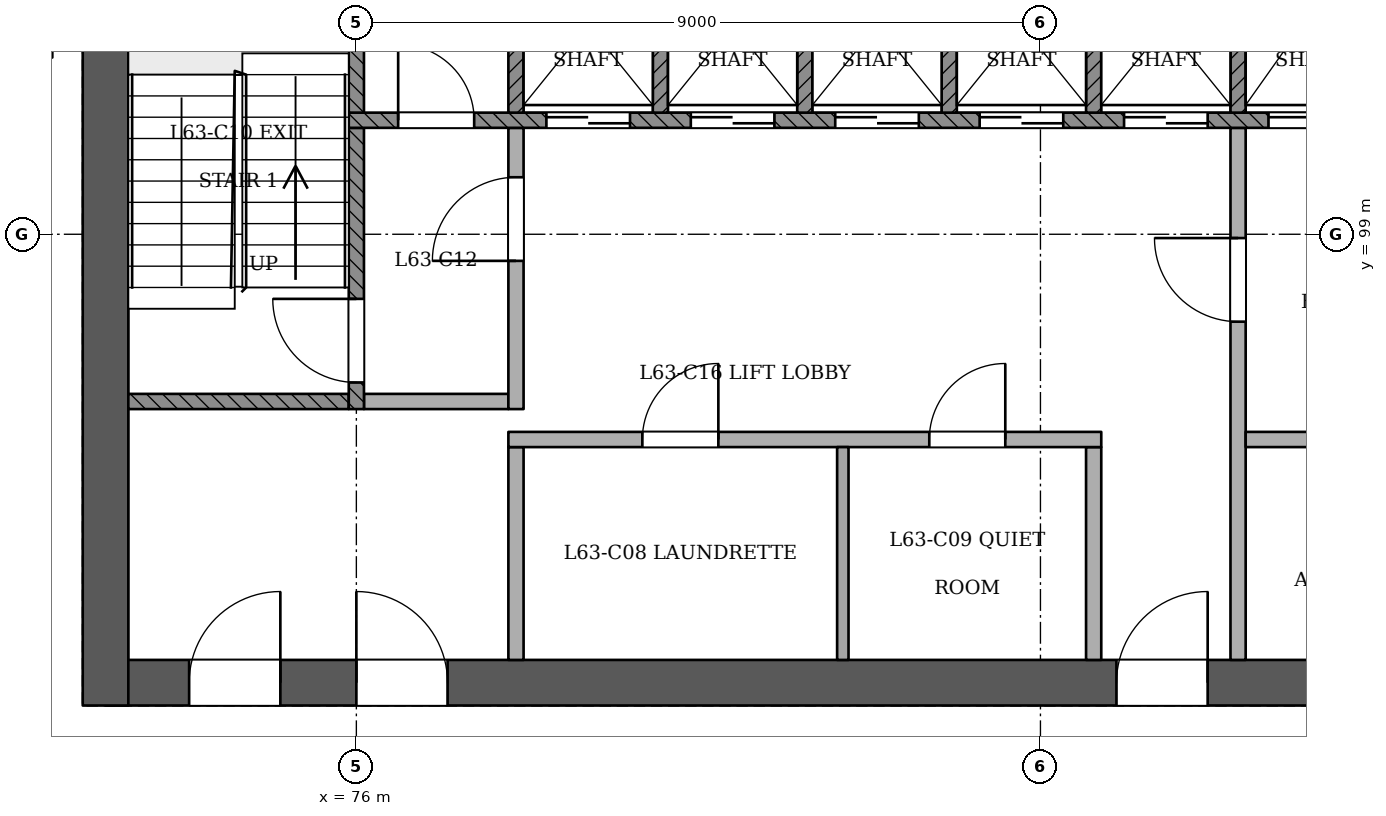
"""IFC4 building model, lengths in metres.
Left out: names, types, materials, properties, quantities, classifications, styles, units other than length and angle.
Written with IfcOpenShell. Run it as: python <this file> out.ifc"""

import sys

from ifc_helpers import new_model, si_unit, direction, frame, frame_2d, origin, place, context, subcontext, project, spatial, rectangle, extrude, element, fill, save


model = new_model("IFC4")
c1 = context("Model", 3, precision=1e-05, world=origin(), true_north=direction((0.0, 1.0)))
c2 = subcontext(c1, "Body", "Model", "MODEL_VIEW")
j1 = project(units=[si_unit("LENGTHUNIT", "METRE"), si_unit("PLANEANGLEUNIT", "RADIAN")], contexts=[c1])
p1 = place(None, origin())
s1 = spatial("IfcSite", under=j1, at=p1, CompositionType="ELEMENT")
p2 = place(p1, origin())
s2 = spatial("IfcBuilding", under=s1, at=p2, CompositionType="ELEMENT")
p3 = place(p2, frame((0.0, 0.0, 246.4)))
s3 = spatial("IfcBuildingStorey", under=s2, at=p3, CompositionType="ELEMENT", Elevation=246.4)
p4 = place(p3, frame((72.7, 93.1, 0.0), z_axis=(0.0, 0.0, 1.0), x_axis=(1.0, 0.0, 0.0)))
e1 = element("IfcWall", 1, at=p4, inside=s3, PredefinedType="SHEAR", context=c2, shape_type="SweptSolid", body=[
    extrude(rectangle(XDim=24.9, YDim=0.6, at=frame_2d((12.45, 0.0))), origin(), (0.0, 0.0, 1.0), 3.6),
])
p5 = place(p4, frame((1.1, 0.0, 0.0)))
e2 = element("IfcOpeningElement", 2, at=p5, cuts=e1, PredefinedType="OPENING", context=c2, shape_type="SweptSolid", body=[
    extrude(rectangle(XDim=1.2, YDim=2.1, at=frame_2d((0.6, 1.05))), frame((0.0, 0.311, 0.0), z_axis=(0.0, -1.0, 0.0), x_axis=(1.0, 0.0, 0.0)), (0.0, 0.0, 1.0), 0.621),
])
p6 = place(p4, frame((3.3, 0.0, 0.0)))
e3 = element("IfcOpeningElement", 3, at=p6, cuts=e1, PredefinedType="OPENING", context=c2, shape_type="SweptSolid", body=[
    extrude(rectangle(XDim=1.2, YDim=2.1, at=frame_2d((0.6, 1.05))), frame((0.0, 0.311, 0.0), z_axis=(0.0, -1.0, 0.0), x_axis=(1.0, 0.0, 0.0)), (0.0, 0.0, 1.0), 0.621),
])
p7 = place(p4, frame((13.3, 0.0, 0.0)))
e4 = element("IfcOpeningElement", 4, at=p7, cuts=e1, PredefinedType="OPENING", context=c2, shape_type="SweptSolid", body=[
    extrude(rectangle(XDim=1.2, YDim=2.1, at=frame_2d((0.6, 1.05))), frame((0.0, 0.311, 0.0), z_axis=(0.0, -1.0, 0.0), x_axis=(1.0, 0.0, 0.0)), (0.0, 0.0, 1.0), 0.621),
])
p8 = place(p4, frame((16.012, 0.0, 0.0)))
e5 = element("IfcOpeningElement", 5, at=p8, cuts=e1, PredefinedType="OPENING", context=c2, shape_type="SweptSolid", body=[
    extrude(rectangle(XDim=1.0, YDim=2.1, at=frame_2d((0.5, 1.05))), frame((0.0, 0.311, 0.0), z_axis=(0.0, -1.0, 0.0), x_axis=(1.0, 0.0, 0.0)), (0.0, 0.0, 1.0), 0.621),
])
p9 = place(p4, frame((19.9, 0.0, 0.0)))
e6 = element("IfcOpeningElement", 6, at=p9, cuts=e1, PredefinedType="OPENING", context=c2, shape_type="SweptSolid", body=[
    extrude(rectangle(XDim=1.0, YDim=2.1, at=frame_2d((0.5, 1.05))), frame((0.0, 0.311, 0.0), z_axis=(0.0, -1.0, 0.0), x_axis=(1.0, 0.0, 0.0)), (0.0, 0.0, 1.0), 0.621),
])
p10 = place(p4, frame((23.038, 0.0, 0.0)))
e7 = element("IfcOpeningElement", 7, at=p10, cuts=e1, PredefinedType="OPENING", context=c2, shape_type="SweptSolid", body=[
    extrude(rectangle(XDim=1.0, YDim=2.1, at=frame_2d((0.5, 1.05))), frame((0.0, 0.311, 0.0), z_axis=(0.0, -1.0, 0.0), x_axis=(1.0, 0.0, 0.0)), (0.0, 0.0, 1.0), 0.621),
])
p11 = place(p3, frame((72.7, 103.7, 0.0), z_axis=(0.0, 0.0, 1.0), x_axis=(0.0, -1.0, 0.0)))
e8 = element("IfcWall", 8, at=p11, inside=s3, PredefinedType="SHEAR", context=c2, shape_type="SweptSolid", body=[
    extrude(rectangle(XDim=10.9, YDim=0.6, at=frame_2d((5.45, 0.0))), origin(), (0.0, 0.0, 1.0), 3.6),
])
p12 = place(p3, frame((72.0, 101.4, 0.0), z_axis=(0.0, 0.0, 1.0), x_axis=(-1.0, 0.0, 0.0)))
e9 = element("IfcWall", 9, at=p12, inside=s3, PredefinedType="PARTITIONING", context=c2, shape_type="SweptSolid", body=[
    extrude(rectangle(XDim=1.8, YDim=0.15, at=frame_2d((0.9, 0.0))), origin(), (0.0, 0.0, 1.0), 3.2),
])
p13 = place(p12, frame((0.525, 0.0, 0.0)))
e10 = element("IfcOpeningElement", 10, at=p13, cuts=e9, PredefinedType="OPENING", context=c2, shape_type="SweptSolid", body=[
    extrude(rectangle(XDim=1.0, YDim=2.1, at=frame_2d((0.5, 1.05))), frame((0.0, 0.085, 0.0), z_axis=(0.0, -1.0, 0.0), x_axis=(1.0, 0.0, 0.0)), (0.0, 0.0, 1.0), 0.171),
])
p14 = place(p3, frame((78.1, 93.4, 0.0), z_axis=(0.0, 0.0, 1.0), x_axis=(0.0, 1.0, 0.0)))
e11 = element("IfcWall", 11, at=p14, inside=s3, PredefinedType="PARTITIONING", context=c2, shape_type="SweptSolid", body=[
    extrude(rectangle(XDim=2.8, YDim=0.2, at=frame_2d((1.4, 0.0))), origin(), (0.0, 0.0, 1.0), 3.2),
])
p15 = place(p3, frame((82.4, 93.4, 0.0), z_axis=(0.0, 0.0, 1.0), x_axis=(0.0, 1.0, 0.0)))
e12 = element("IfcWall", 12, at=p15, inside=s3, PredefinedType="PARTITIONING", context=c2, shape_type="SweptSolid", body=[
    extrude(rectangle(XDim=2.8, YDim=0.15, at=frame_2d((1.4, 0.0))), origin(), (0.0, 0.0, 1.0), 3.2),
])
p16 = place(p3, frame((85.7, 93.4, 0.0), z_axis=(0.0, 0.0, 1.0), x_axis=(0.0, 1.0, 0.0)))
e13 = element("IfcWall", 13, at=p16, inside=s3, PredefinedType="PARTITIONING", context=c2, shape_type="SweptSolid", body=[
    extrude(rectangle(XDim=2.8, YDim=0.2, at=frame_2d((1.4, 0.0))), origin(), (0.0, 0.0, 1.0), 3.2),
])
p17 = place(p3, frame((87.6, 93.4, 0.0), z_axis=(0.0, 0.0, 1.0), x_axis=(0.0, 1.0, 0.0)))
e14 = element("IfcWall", 14, at=p17, inside=s3, PredefinedType="PARTITIONING", context=c2, shape_type="SweptSolid", body=[
    extrude(rectangle(XDim=7.0, YDim=0.2, at=frame_2d((3.5, 0.0))), origin(), (0.0, 0.0, 1.0), 3.2),
])
p18 = place(p17, frame((4.45, 0.0, 0.0)))
e15 = element("IfcOpeningElement", 15, at=p18, cuts=e14, PredefinedType="OPENING", context=c2, shape_type="SweptSolid", body=[
    extrude(rectangle(XDim=1.1, YDim=2.1, at=frame_2d((0.55, 1.05))), frame((0.0, 0.11, 0.0), z_axis=(0.0, -1.0, 0.0), x_axis=(1.0, 0.0, 0.0)), (0.0, 0.0, 1.0), 0.221),
])
p19 = place(p3, frame((78.0, 96.3, 0.0), z_axis=(0.0, 0.0, 1.0), x_axis=(1.0, 0.0, 0.0)))
e16 = element("IfcWall", 16, at=p19, inside=s3, PredefinedType="PARTITIONING", context=c2, shape_type="SweptSolid", body=[
    extrude(rectangle(XDim=7.8, YDim=0.2, at=frame_2d((3.9, 0.0))), origin(), (0.0, 0.0, 1.0), 3.2),
])
p20 = place(p19, frame((1.762, 0.0, 0.0)))
e17 = element("IfcOpeningElement", 17, at=p20, cuts=e16, PredefinedType="OPENING", context=c2, shape_type="SweptSolid", body=[
    extrude(rectangle(XDim=1.0, YDim=2.1, at=frame_2d((0.5, 1.05))), frame((0.0, 0.11, 0.0), z_axis=(0.0, -1.0, 0.0), x_axis=(1.0, 0.0, 0.0)), (0.0, 0.0, 1.0), 0.221),
])
p21 = place(p19, frame((5.538, 0.0, 0.0)))
e18 = element("IfcOpeningElement", 18, at=p21, cuts=e16, PredefinedType="OPENING", context=c2, shape_type="SweptSolid", body=[
    extrude(rectangle(XDim=1.0, YDim=2.1, at=frame_2d((0.5, 1.05))), frame((0.0, 0.11, 0.0), z_axis=(0.0, -1.0, 0.0), x_axis=(1.0, 0.0, 0.0)), (0.0, 0.0, 1.0), 0.221),
])
p22 = place(p3, frame((87.7, 96.3, 0.0), z_axis=(0.0, 0.0, 1.0), x_axis=(1.0, 0.0, 0.0)))
e19 = element("IfcWall", 19, at=p22, inside=s3, PredefinedType="PARTITIONING", context=c2, shape_type="SweptSolid", body=[
    extrude(rectangle(XDim=3.6, YDim=0.2, at=frame_2d((1.8, 0.0))), origin(), (0.0, 0.0, 1.0), 3.2),
])
p23 = place(p3, frame((73.0, 96.8, 0.0), z_axis=(0.0, 0.0, 1.0), x_axis=(1.0, 0.0, 0.0)))
e20 = element("IfcWall", 20, at=p23, inside=s3, PredefinedType="SOLIDWALL", context=c2, shape_type="SweptSolid", body=[
    extrude(rectangle(XDim=2.9, YDim=0.2, at=frame_2d((1.45, 0.0))), origin(), (0.0, 0.0, 1.0), 3.2),
])
p24 = place(p3, frame((76.0, 96.7, 0.0), z_axis=(0.0, 0.0, 1.0), x_axis=(0.0, 1.0, 0.0)))
e21 = element("IfcWall", 21, at=p24, inside=s3, PredefinedType="SOLIDWALL", context=c2, shape_type="SweptSolid", body=[
    extrude(rectangle(XDim=3.7, YDim=0.2, at=frame_2d((1.85, 0.0))), origin(), (0.0, 0.0, 1.0), 3.2),
])
p25 = place(p24, frame((0.35, 0.0, 0.0)))
e22 = element("IfcOpeningElement", 22, at=p25, cuts=e21, PredefinedType="OPENING", context=c2, shape_type="SweptSolid", body=[
    extrude(rectangle(XDim=1.1, YDim=2.1, at=frame_2d((0.55, 1.05))), frame((0.0, 0.11, 0.0), z_axis=(0.0, -1.0, 0.0), x_axis=(1.0, 0.0, 0.0)), (0.0, 0.0, 1.0), 0.221),
])
p26 = place(p3, frame((76.1, 96.8, 0.0), z_axis=(0.0, 0.0, 1.0), x_axis=(1.0, 0.0, 0.0)))
e23 = element("IfcWall", 23, at=p26, inside=s3, PredefinedType="PARTITIONING", context=c2, shape_type="SweptSolid", body=[
    extrude(rectangle(XDim=1.9, YDim=0.2, at=frame_2d((0.95, 0.0))), origin(), (0.0, 0.0, 1.0), 3.2),
])
p27 = place(p3, frame((78.1, 96.7, 0.0), z_axis=(0.0, 0.0, 1.0), x_axis=(0.0, 1.0, 0.0)))
e24 = element("IfcWall", 24, at=p27, inside=s3, PredefinedType="PARTITIONING", context=c2, shape_type="SweptSolid", body=[
    extrude(rectangle(XDim=3.7, YDim=0.2, at=frame_2d((1.85, 0.0))), origin(), (0.0, 0.0, 1.0), 3.2),
])
p28 = place(p27, frame((1.95, 0.0, 0.0)))
e25 = element("IfcOpeningElement", 25, at=p28, cuts=e24, PredefinedType="OPENING", context=c2, shape_type="SweptSolid", body=[
    extrude(rectangle(XDim=1.1, YDim=2.1, at=frame_2d((0.55, 1.05))), frame((0.0, 0.11, 0.0), z_axis=(0.0, -1.0, 0.0), x_axis=(1.0, 0.0, 0.0)), (0.0, 0.0, 1.0), 0.221),
])
p29 = place(p3, frame((75.9, 100.5, 0.0), z_axis=(0.0, 0.0, 1.0), x_axis=(1.0, 0.0, 0.0)))
e26 = element("IfcWall", 26, at=p29, inside=s3, PredefinedType="SOLIDWALL", context=c2, shape_type="SweptSolid", body=[
    extrude(rectangle(XDim=18.2, YDim=0.2, at=frame_2d((9.1, 0.0))), origin(), (0.0, 0.0, 1.0), 3.2),
])
p30 = place(p29, frame((2.6, 0.0, 0.0)))
e27 = element("IfcOpeningElement", 27, at=p30, cuts=e26, PredefinedType="OPENING", context=c2, shape_type="SweptSolid", body=[
    extrude(rectangle(XDim=1.1, YDim=2.1, at=frame_2d((0.55, 1.05))), frame((0.0, 0.11, 0.0), z_axis=(0.0, -1.0, 0.0), x_axis=(1.0, 0.0, 0.0)), (0.0, 0.0, 1.0), 0.221),
])
p31 = place(p29, frame((4.5, 0.0, 0.0)))
e28 = element("IfcOpeningElement", 28, at=p31, cuts=e26, PredefinedType="OPENING", context=c2, shape_type="SweptSolid", body=[
    extrude(rectangle(XDim=1.1, YDim=2.1, at=frame_2d((0.55, 1.05))), frame((0.0, 0.11, 0.0), z_axis=(0.0, -1.0, 0.0), x_axis=(1.0, 0.0, 0.0)), (0.0, 0.0, 1.0), 0.221),
])
p32 = place(p29, frame((6.4, 0.0, 0.0)))
e29 = element("IfcOpeningElement", 29, at=p32, cuts=e26, PredefinedType="OPENING", context=c2, shape_type="SweptSolid", body=[
    extrude(rectangle(XDim=1.1, YDim=2.1, at=frame_2d((0.55, 1.05))), frame((0.0, 0.11, 0.0), z_axis=(0.0, -1.0, 0.0), x_axis=(1.0, 0.0, 0.0)), (0.0, 0.0, 1.0), 0.221),
])
p33 = place(p29, frame((8.3, 0.0, 0.0)))
e30 = element("IfcOpeningElement", 30, at=p33, cuts=e26, PredefinedType="OPENING", context=c2, shape_type="SweptSolid", body=[
    extrude(rectangle(XDim=1.1, YDim=2.1, at=frame_2d((0.55, 1.05))), frame((0.0, 0.11, 0.0), z_axis=(0.0, -1.0, 0.0), x_axis=(1.0, 0.0, 0.0)), (0.0, 0.0, 1.0), 0.221),
])
p34 = place(p29, frame((10.2, 0.0, 0.0)))
e31 = element("IfcOpeningElement", 31, at=p34, cuts=e26, PredefinedType="OPENING", context=c2, shape_type="SweptSolid", body=[
    extrude(rectangle(XDim=1.1, YDim=2.1, at=frame_2d((0.55, 1.05))), frame((0.0, 0.11, 0.0), z_axis=(0.0, -1.0, 0.0), x_axis=(1.0, 0.0, 0.0)), (0.0, 0.0, 1.0), 0.221),
])
p35 = place(p29, frame((12.1, 0.0, 0.0)))
e32 = element("IfcOpeningElement", 32, at=p35, cuts=e26, PredefinedType="OPENING", context=c2, shape_type="SweptSolid", body=[
    extrude(rectangle(XDim=1.1, YDim=2.1, at=frame_2d((0.55, 1.05))), frame((0.0, 0.11, 0.0), z_axis=(0.0, -1.0, 0.0), x_axis=(1.0, 0.0, 0.0)), (0.0, 0.0, 1.0), 0.221),
])
p36 = place(p29, frame((14.0, 0.0, 0.0)))
e33 = element("IfcOpeningElement", 33, at=p36, cuts=e26, PredefinedType="OPENING", context=c2, shape_type="SweptSolid", body=[
    extrude(rectangle(XDim=1.1, YDim=2.1, at=frame_2d((0.55, 1.05))), frame((0.0, 0.11, 0.0), z_axis=(0.0, -1.0, 0.0), x_axis=(1.0, 0.0, 0.0)), (0.0, 0.0, 1.0), 0.221),
])
p37 = place(p29, frame((0.65, 0.0, 0.0)))
e34 = element("IfcOpeningElement", 34, at=p37, cuts=e26, PredefinedType="OPENING", context=c2, shape_type="SweptSolid", body=[
    extrude(rectangle(XDim=1.0, YDim=2.1, at=frame_2d((0.5, 1.05))), frame((0.0, 0.11, 0.0), z_axis=(0.0, -1.0, 0.0), x_axis=(1.0, 0.0, 0.0)), (0.0, 0.0, 1.0), 0.221),
])
p38 = place(p29, frame((16.3, 0.0, 0.0)))
e35 = element("IfcOpeningElement", 35, at=p38, cuts=e26, PredefinedType="OPENING", context=c2, shape_type="SweptSolid", body=[
    extrude(rectangle(XDim=1.0, YDim=2.1, at=frame_2d((0.5, 1.05))), frame((0.0, 0.11, 0.0), z_axis=(0.0, -1.0, 0.0), x_axis=(1.0, 0.0, 0.0)), (0.0, 0.0, 1.0), 0.221),
])
for number, where, z_axis, x_axis in (
    (36, (76.0, 100.6, 0.0), (0.0, 0.0, 1.0), (0.0, 1.0, 0.0)),
    (37, (78.1, 100.6, 0.0), (0.0, 0.0, 1.0), (0.0, 1.0, 0.0)),
    (38, (80.0, 100.6, 0.0), (0.0, 0.0, 1.0), (0.0, 1.0, 0.0)),
    (39, (81.9, 100.6, 0.0), (0.0, 0.0, 1.0), (0.0, 1.0, 0.0)),
    (40, (83.8, 100.6, 0.0), (0.0, 0.0, 1.0), (0.0, 1.0, 0.0)),
    (41, (85.7, 100.6, 0.0), (0.0, 0.0, 1.0), (0.0, 1.0, 0.0)),
    (42, (87.6, 100.6, 0.0), (0.0, 0.0, 1.0), (0.0, 1.0, 0.0)),
):
    element("IfcWall", number, at=place(p3, frame(where, z_axis=z_axis, x_axis=x_axis)), inside=s3, PredefinedType="SOLIDWALL", context=c2, shape_type="SweptSolid", body=[
        extrude(rectangle(XDim=2.8, YDim=0.2, at=frame_2d((1.4, 0.0))), origin(), (0.0, 0.0, 1.0), 3.2),
    ])
p39 = place(p30, origin())
e43 = element("IfcDoor", 43, at=p39, inside=s3, OperationType="SLIDING_TO_RIGHT", PredefinedType="NOTDEFINED", context=c2, shape_type="SweptSolid", body=[
    extrude(rectangle(XDim=1.1, YDim=2.1, at=frame_2d((0.55, 1.05))), frame((0.0, 0.025, 0.0), z_axis=(0.0, -1.0, 0.0), x_axis=(1.0, 0.0, 0.0)), (0.0, 0.0, 1.0), 0.05),
])
fill(e27, e43)
p40 = place(p31, origin())
e44 = element("IfcDoor", 44, at=p40, inside=s3, OperationType="SLIDING_TO_LEFT", PredefinedType="NOTDEFINED", context=c2, shape_type="SweptSolid", body=[
    extrude(rectangle(XDim=1.1, YDim=2.1, at=frame_2d((0.55, 1.05))), frame((0.0, 0.025, 0.0), z_axis=(0.0, -1.0, 0.0), x_axis=(1.0, 0.0, 0.0)), (0.0, 0.0, 1.0), 0.05),
])
fill(e28, e44)
p41 = place(p32, origin())
e45 = element("IfcDoor", 45, at=p41, inside=s3, OperationType="SLIDING_TO_RIGHT", PredefinedType="NOTDEFINED", context=c2, shape_type="SweptSolid", body=[
    extrude(rectangle(XDim=1.1, YDim=2.1, at=frame_2d((0.55, 1.05))), frame((0.0, 0.025, 0.0), z_axis=(0.0, -1.0, 0.0), x_axis=(1.0, 0.0, 0.0)), (0.0, 0.0, 1.0), 0.05),
])
fill(e29, e45)
p42 = place(p33, origin())
e46 = element("IfcDoor", 46, at=p42, inside=s3, OperationType="SLIDING_TO_LEFT", PredefinedType="NOTDEFINED", context=c2, shape_type="SweptSolid", body=[
    extrude(rectangle(XDim=1.1, YDim=2.1, at=frame_2d((0.55, 1.05))), frame((0.0, 0.025, 0.0), z_axis=(0.0, -1.0, 0.0), x_axis=(1.0, 0.0, 0.0)), (0.0, 0.0, 1.0), 0.05),
])
fill(e30, e46)
p43 = place(p34, origin())
e47 = element("IfcDoor", 47, at=p43, inside=s3, OperationType="SLIDING_TO_RIGHT", PredefinedType="NOTDEFINED", context=c2, shape_type="SweptSolid", body=[
    extrude(rectangle(XDim=1.1, YDim=2.1, at=frame_2d((0.55, 1.05))), frame((0.0, 0.025, 0.0), z_axis=(0.0, -1.0, 0.0), x_axis=(1.0, 0.0, 0.0)), (0.0, 0.0, 1.0), 0.05),
])
fill(e31, e47)
p44 = place(p35, origin())
e48 = element("IfcDoor", 48, at=p44, inside=s3, OperationType="SLIDING_TO_RIGHT", PredefinedType="NOTDEFINED", context=c2, shape_type="SweptSolid", body=[
    extrude(rectangle(XDim=1.1, YDim=2.1, at=frame_2d((0.55, 1.05))), frame((0.0, 0.025, 0.0), z_axis=(0.0, -1.0, 0.0), x_axis=(1.0, 0.0, 0.0)), (0.0, 0.0, 1.0), 0.05),
])
fill(e32, e48)
p45 = place(p25, origin())
e49 = element("IfcDoor", 49, at=p45, inside=s3, OperationType="SINGLE_SWING_RIGHT", PredefinedType="NOTDEFINED", context=c2, shape_type="SweptSolid", body=[
    extrude(rectangle(XDim=1.1, YDim=2.1, at=frame_2d((0.55, 1.05))), frame((0.0, 0.025, 0.0), z_axis=(0.0, -1.0, 0.0), x_axis=(1.0, 0.0, 0.0)), (0.0, 0.0, 1.0), 0.05),
])
fill(e22, e49)
p46 = place(p28, origin())
e50 = element("IfcDoor", 50, at=p46, inside=s3, OperationType="SINGLE_SWING_LEFT", PredefinedType="NOTDEFINED", context=c2, shape_type="SweptSolid", body=[
    extrude(rectangle(XDim=1.1, YDim=2.1, at=frame_2d((0.55, 1.05))), frame((0.0, 0.025, 0.0), z_axis=(0.0, -1.0, 0.0), x_axis=(1.0, 0.0, 0.0)), (0.0, 0.0, 1.0), 0.05),
])
fill(e25, e50)
p47 = place(p18, origin())
e51 = element("IfcDoor", 51, at=p47, inside=s3, OperationType="SINGLE_SWING_RIGHT", PredefinedType="NOTDEFINED", context=c2, shape_type="SweptSolid", body=[
    extrude(rectangle(XDim=1.1, YDim=2.1, at=frame_2d((0.55, 1.05))), frame((0.0, 0.025, 0.0), z_axis=(0.0, -1.0, 0.0), x_axis=(1.0, 0.0, 0.0)), (0.0, 0.0, 1.0), 0.05),
])
fill(e15, e51)
p48 = place(p5, origin())
e52 = element("IfcDoor", 52, at=p48, inside=s3, OperationType="SINGLE_SWING_RIGHT", PredefinedType="NOTDEFINED", context=c2, shape_type="SweptSolid", body=[
    extrude(rectangle(XDim=1.2, YDim=2.1, at=frame_2d((0.6, 1.05))), frame((0.0, 0.025, 0.0), z_axis=(0.0, -1.0, 0.0), x_axis=(1.0, 0.0, 0.0)), (0.0, 0.0, 1.0), 0.05),
])
fill(e2, e52)
p49 = place(p6, origin())
e53 = element("IfcDoor", 53, at=p49, inside=s3, OperationType="SINGLE_SWING_LEFT", PredefinedType="NOTDEFINED", context=c2, shape_type="SweptSolid", body=[
    extrude(rectangle(XDim=1.2, YDim=2.1, at=frame_2d((0.6, 1.05))), frame((0.0, 0.025, 0.0), z_axis=(0.0, -1.0, 0.0), x_axis=(1.0, 0.0, 0.0)), (0.0, 0.0, 1.0), 0.05),
])
fill(e3, e53)
p50 = place(p7, origin())
e54 = element("IfcDoor", 54, at=p50, inside=s3, OperationType="SINGLE_SWING_RIGHT", PredefinedType="NOTDEFINED", context=c2, shape_type="SweptSolid", body=[
    extrude(rectangle(XDim=1.2, YDim=2.1, at=frame_2d((0.6, 1.05))), frame((0.0, 0.025, 0.0), z_axis=(0.0, -1.0, 0.0), x_axis=(1.0, 0.0, 0.0)), (0.0, 0.0, 1.0), 0.05),
])
fill(e4, e54)
p51 = place(p37, origin())
e55 = element("IfcDoor", 55, at=p51, inside=s3, OperationType="SINGLE_SWING_LEFT", PredefinedType="NOTDEFINED", context=c2, shape_type="SweptSolid", body=[
    extrude(rectangle(XDim=1.0, YDim=2.1, at=frame_2d((0.5, 1.05))), frame((0.0, 0.025, 0.0), z_axis=(0.0, -1.0, 0.0), x_axis=(1.0, 0.0, 0.0)), (0.0, 0.0, 1.0), 0.05),
])
fill(e34, e55)
p52 = place(p20, origin())
e56 = element("IfcDoor", 56, at=p52, inside=s3, OperationType="SINGLE_SWING_RIGHT", PredefinedType="NOTDEFINED", context=c2, shape_type="SweptSolid", body=[
    extrude(rectangle(XDim=1.0, YDim=2.1, at=frame_2d((0.5, 1.05))), frame((0.0, 0.025, 0.0), z_axis=(0.0, -1.0, 0.0), x_axis=(1.0, 0.0, 0.0)), (0.0, 0.0, 1.0), 0.05),
])
fill(e17, e56)
p53 = place(p21, origin())
e57 = element("IfcDoor", 57, at=p53, inside=s3, OperationType="SINGLE_SWING_RIGHT", PredefinedType="NOTDEFINED", context=c2, shape_type="SweptSolid", body=[
    extrude(rectangle(XDim=1.0, YDim=2.1, at=frame_2d((0.5, 1.05))), frame((0.0, 0.025, 0.0), z_axis=(0.0, -1.0, 0.0), x_axis=(1.0, 0.0, 0.0)), (0.0, 0.0, 1.0), 0.05),
])
fill(e18, e57)
save(model, sys.argv[1])
